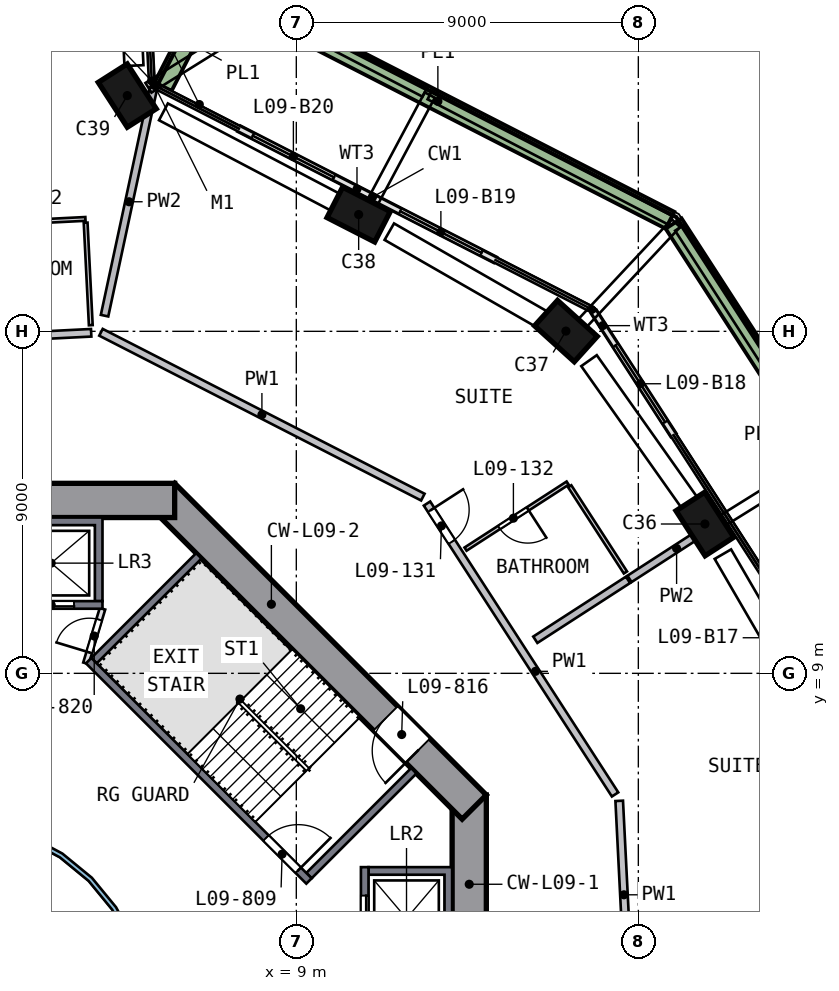
"""IFC4 building model, lengths in metres.
Left out: names, types, materials, properties, quantities, classifications, styles, units other than length and angle.
Written with IfcOpenShell. Run it as: python <this file> out.ifc"""

import sys

from ifc_helpers import new_model, si_unit, direction, frame, frame_2d, origin, origin_2d, place, context, subcontext, project, spatial, polyline, rectangle, outline, extrude, element, fill, save


model = new_model("IFC4")
c1 = context("Model", 3, precision=1e-05, world=origin(), true_north=direction((0.0, 1.0)))
c2 = subcontext(c1, "Body", "Model", "MODEL_VIEW")
j1 = project(units=[si_unit("LENGTHUNIT", "METRE"), si_unit("PLANEANGLEUNIT", "RADIAN")], contexts=[c1])
p1 = place(None, origin())
s1 = spatial("IfcSite", under=j1, at=p1, CompositionType="ELEMENT")
p2 = place(p1, origin())
s2 = spatial("IfcBuilding", under=s1, at=p2, CompositionType="ELEMENT")
p3 = place(p2, frame((0.0, 0.0, 46.0)))
s3 = spatial("IfcBuildingStorey", under=s2, at=p3, CompositionType="ELEMENT", Elevation=46.0)
p4 = place(p3, frame((19.826, 12.816, 0.0), z_axis=(-0.061752629, 0.093845743, 0.993669759), x_axis=(-0.539148529, 0.83468518, -0.112336608)))
e1 = element("IfcColumn", 1, at=p4, inside=s3, PredefinedType="COLUMN", context=c2, shape_type="SweptSolid", body=[
    extrude(rectangle(XDim=1.4, YDim=0.9, at=origin_2d()), origin(), (0.0, 0.0, 1.0), 3.21),
])
p5 = place(p3, frame((16.198, 17.914, 0.0), z_axis=(-0.085835533, 0.076332042, 0.993380934), x_axis=(0.736686462, -0.666408039, 0.114862444)))
e2 = element("IfcColumn", 2, at=p5, inside=s3, PredefinedType="COLUMN", context=c2, shape_type="SweptSolid", body=[
    extrude(rectangle(XDim=1.4, YDim=0.9, at=origin_2d()), origin(), (0.0, 0.0, 1.0), 3.211),
])
p6 = place(p3, frame((10.762, 21.013, 0.0), z_axis=(-0.100386469, 0.050345335, 0.993673943), x_axis=(-0.884418594, 0.452981845, -0.112299596)))
e3 = element("IfcColumn", 3, at=p6, inside=s3, PredefinedType="COLUMN", context=c2, shape_type="SweptSolid", body=[
    extrude(rectangle(XDim=1.4, YDim=0.9, at=origin_2d()), origin(), (0.0, 0.0, 1.0), 3.21),
])
p7 = place(p3, frame((4.691, 24.178, 0.0), z_axis=(-0.115152044, 0.021282226, 0.993119869), x_axis=(0.535782843, -0.8405444, 0.080136495)))
e4 = element("IfcColumn", 4, at=p7, inside=s3, PredefinedType="COLUMN", context=c2, shape_type="SweptSolid", body=[
    extrude(rectangle(XDim=1.4, YDim=0.9, at=origin_2d()), origin(), (0.0, 0.0, 1.0), 3.212),
])
p8 = place(p3, frame((13.55, -5.799, 0.0), z_axis=(0.0, 0.0, 1.0), x_axis=(0.0, 1.0, 0.0)))
e5 = element("IfcWall", 5, at=p8, inside=s3, PredefinedType="SHEAR", context=c2, shape_type="SweptSolid", body=[
    extrude(rectangle(XDim=11.598, YDim=0.9, at=frame_2d((5.799, 0.0))), origin(), (0.0, 0.0, 1.0), 3.5),
])
p9 = place(p8, frame((4.899, 0.0, 0.0)))
e6 = element("IfcOpeningElement", 6, at=p9, cuts=e5, PredefinedType="OPENING", context=c2, shape_type="SweptSolid", body=[
    extrude(rectangle(XDim=1.8, YDim=2.1, at=frame_2d((0.9, 1.05))), frame((0.0, 0.46, 0.0), z_axis=(0.0, -1.0, 0.0), x_axis=(1.0, 0.0, 0.0)), (0.0, 0.0, 1.0), 0.92),
])
p10 = place(p3, frame((13.682, 5.481, 0.0), z_axis=(0.0, 0.0, 1.0), x_axis=(-0.707106781, 0.707106781, 0.0)))
e7 = element("IfcWall", 7, at=p10, inside=s3, PredefinedType="SHEAR", context=c2, shape_type="SweptSolid", body=[
    extrude(rectangle(XDim=11.598, YDim=0.9, at=frame_2d((5.799, 0.0))), origin(), (0.0, 0.0, 1.0), 3.5),
])
p11 = place(p10, frame((2.099, 0.0, 0.0)))
e8 = element("IfcOpeningElement", 8, at=p11, cuts=e7, PredefinedType="OPENING", context=c2, shape_type="SweptSolid", body=[
    extrude(rectangle(XDim=1.2, YDim=2.1, at=frame_2d((0.6, 1.05))), frame((0.0, 0.46, 0.0), z_axis=(0.0, -1.0, 0.0), x_axis=(1.0, 0.0, 0.0)), (0.0, 0.0, 1.0), 0.92),
])
p12 = place(p3, frame((5.799, 13.55, 0.0), z_axis=(0.0, 0.0, 1.0), x_axis=(-1.0, 0.0, 0.0)))
e9 = element("IfcWall", 9, at=p12, inside=s3, PredefinedType="SHEAR", context=c2, shape_type="SweptSolid", body=[
    extrude(rectangle(XDim=11.598, YDim=0.9, at=frame_2d((5.799, 0.0))), origin(), (0.0, 0.0, 1.0), 3.5),
])
p13 = place(p12, frame((4.899, 0.0, 0.0)))
e10 = element("IfcOpeningElement", 10, at=p13, cuts=e9, PredefinedType="OPENING", context=c2, shape_type="SweptSolid", body=[
    extrude(rectangle(XDim=1.8, YDim=2.1, at=frame_2d((0.9, 1.05))), frame((0.0, 0.46, 0.0), z_axis=(0.0, -1.0, 0.0), x_axis=(1.0, 0.0, 0.0)), (0.0, 0.0, 1.0), 0.92),
])
p14 = place(p3, frame((18.921, 15.277, 0.0), z_axis=(0.0, 0.0, 1.0), x_axis=(-0.542898146, 0.839798549, 0.0)))
e11 = element("IfcWall", 11, at=p14, inside=s3, PredefinedType="SOLIDWALL", context=c2, shape_type="SweptSolid", body=[
    extrude(rectangle(XDim=3.842, YDim=0.15, at=frame_2d((1.921, 0.0))), origin(), (0.0, 0.0, 1.0), 2.425),
])
p15 = place(p14, frame((0.4, 0.0, 0.0)))
e12 = element("IfcOpeningElement", 12, at=p15, cuts=e11, PredefinedType="OPENING", context=c2, shape_type="SweptSolid", body=[
    extrude(rectangle(XDim=2.4, YDim=2.4, at=frame_2d((1.2, 1.2))), frame((0.0, 0.085, 0.0), z_axis=(0.0, -1.0, 0.0), x_axis=(1.0, 0.0, 0.0)), (0.0, 0.0, 1.0), 0.17),
])
p16 = place(p3, frame((14.228, 19.883, 0.0), z_axis=(0.0, 0.0, 1.0), x_axis=(-0.890044707, 0.455873249, 0.0)))
e13 = element("IfcWall", 13, at=p16, inside=s3, PredefinedType="SOLIDWALL", context=c2, shape_type="SweptSolid", body=[
    extrude(rectangle(XDim=3.6, YDim=0.15, at=frame_2d((1.8, 0.0))), origin(), (0.0, 0.0, 1.0), 2.425),
])
p17 = place(p16, frame((0.4, 0.0, 0.0)))
e14 = element("IfcOpeningElement", 14, at=p17, cuts=e13, PredefinedType="OPENING", context=c2, shape_type="SweptSolid", body=[
    extrude(rectangle(XDim=2.4, YDim=2.4, at=frame_2d((1.2, 1.2))), frame((0.0, 0.085, 0.0), z_axis=(0.0, -1.0, 0.0), x_axis=(1.0, 0.0, 0.0)), (0.0, 0.0, 1.0), 0.17),
])
p18 = place(p3, frame((11.024, 21.524, 0.0), z_axis=(0.0, 0.0, 1.0), x_axis=(-0.890058005, 0.455847285, 0.0)))
e15 = element("IfcWall", 15, at=p18, inside=s3, PredefinedType="SOLIDWALL", context=c2, shape_type="SweptSolid", body=[
    extrude(rectangle(XDim=3.961, YDim=0.15, at=frame_2d((1.98, 0.0))), origin(), (0.0, 0.0, 1.0), 2.425),
])
p19 = place(p18, frame((1.16, 0.0, 0.0)))
e16 = element("IfcOpeningElement", 16, at=p19, cuts=e15, PredefinedType="OPENING", context=c2, shape_type="SweptSolid", body=[
    extrude(rectangle(XDim=2.4, YDim=2.4, at=frame_2d((1.2, 1.2))), frame((0.0, 0.085, 0.0), z_axis=(0.0, -1.0, 0.0), x_axis=(1.0, 0.0, 0.0)), (0.0, 0.0, 1.0), 0.17),
])
p20 = place(p3, frame((26.107, 9.732, 0.0), z_axis=(0.0, 0.0, 1.0), x_axis=(-0.542889903, 0.839803878, 0.0)))
e17 = element("IfcWall", 17, at=p20, inside=s3, PredefinedType="SOLIDWALL", context=c2, shape_type="SweptSolid", body=[
    extrude(rectangle(XDim=13.224, YDim=0.5, at=frame_2d((6.612, 0.0))), origin(), (0.0, 0.0, 1.0), 0.7),
])
p21 = place(p3, frame((18.832, 20.924, 0.0), z_axis=(0.0, 0.0, 1.0), x_axis=(-0.89005516, 0.45585284, 0.0)))
e18 = element("IfcWall", 18, at=p21, inside=s3, PredefinedType="SOLIDWALL", context=c2, shape_type="SweptSolid", body=[
    extrude(rectangle(XDim=13.723, YDim=0.5, at=frame_2d((6.862, 0.0))), origin(), (0.0, 0.0, 1.0), 0.7),
])
p22 = place(p3, frame((6.726, 26.844, 0.0), z_axis=(0.0, 0.0, 1.0), x_axis=(-0.45587587, -0.890043365, 0.0)))
e19 = element("IfcWall", 19, at=p22, inside=s3, PredefinedType="SOLIDWALL", context=c2, shape_type="SweptSolid", body=[
    extrude(rectangle(XDim=2.699, YDim=0.5, at=frame_2d((1.35, 0.0))), origin(), (0.0, 0.0, 1.0), 0.7),
])
p23 = place(p3, origin())
e20 = element("IfcWall", 20, at=p23, inside=s3, PredefinedType="SOLIDWALL", context=c2, shape_type="SweptSolid", body=[
    extrude(outline(polyline([(13.1, 3.9), (13.1, 1.2), (10.9, 1.2), (10.9, 1.4), (12.9, 1.4), (12.9, 3.7), (10.9, 3.7), (10.9, 3.9), (13.1, 3.9)])), origin(), (0.0, 0.0, 1.0), 3.19),
])
p24 = place(p3, frame((10.8, 1.2, 0.0), z_axis=(0.0, 0.0, 1.0), x_axis=(0.0, 1.0, 0.0)))
e21 = element("IfcWall", 21, at=p24, inside=s3, PredefinedType="SOLIDWALL", context=c2, shape_type="SweptSolid", body=[
    extrude(rectangle(XDim=2.7, YDim=0.2, at=frame_2d((1.35, 0.0))), origin(), (0.0, 0.0, 1.0), 3.19),
])
p25 = place(p24, frame((0.75, 0.0, 0.0)))
e22 = element("IfcOpeningElement", 22, at=p25, cuts=e21, PredefinedType="OPENING", context=c2, shape_type="SweptSolid", body=[
    extrude(rectangle(XDim=1.2, YDim=2.1, at=frame_2d((0.6, 1.05))), frame((0.0, 0.11, 0.0), z_axis=(0.0, -1.0, 0.0), x_axis=(1.0, 0.0, 0.0)), (0.0, 0.0, 1.0), 0.22),
])
p26 = place(p3, origin())
e23 = element("IfcWall", 23, at=p26, inside=s3, PredefinedType="SOLIDWALL", context=c2, shape_type="SweptSolid", body=[
    extrude(outline(polyline([(3.9, 13.1), (3.9, 10.9), (3.7, 10.9), (3.7, 12.9), (1.4, 12.9), (1.4, 10.9), (1.2, 10.9), (1.2, 13.1), (3.9, 13.1)])), origin(), (0.0, 0.0, 1.0), 3.19),
])
p27 = place(p3, frame((1.2, 10.8, 0.0), z_axis=(0.0, 0.0, 1.0), x_axis=(1.0, 0.0, 0.0)))
e24 = element("IfcWall", 24, at=p27, inside=s3, PredefinedType="SOLIDWALL", context=c2, shape_type="SweptSolid", body=[
    extrude(rectangle(XDim=2.7, YDim=0.2, at=frame_2d((1.35, 0.0))), origin(), (0.0, 0.0, 1.0), 3.19),
])
p28 = place(p27, frame((0.75, 0.0, 0.0)))
e25 = element("IfcOpeningElement", 25, at=p28, cuts=e24, PredefinedType="OPENING", context=c2, shape_type="SweptSolid", body=[
    extrude(rectangle(XDim=1.2, YDim=2.1, at=frame_2d((0.6, 1.05))), frame((0.0, 0.11, 0.0), z_axis=(0.0, -1.0, 0.0), x_axis=(1.0, 0.0, 0.0)), (0.0, 0.0, 1.0), 0.22),
])
p29 = place(p3, frame((3.535, 9.334, 0.0), z_axis=(0.0, 0.0, 1.0), x_axis=(0.707106781, -0.707106781, 0.0)))
e26 = element("IfcWall", 26, at=p29, inside=s3, PredefinedType="SOLIDWALL", context=c2, shape_type="SweptSolid", body=[
    extrude(rectangle(XDim=8.2, YDim=0.2, at=frame_2d((4.1, 0.0))), origin(), (0.0, 0.0, 1.0), 3.19),
])
p30 = place(p29, frame((6.6, 0.0, 0.0)))
e27 = element("IfcOpeningElement", 27, at=p30, cuts=e26, PredefinedType="OPENING", context=c2, shape_type="SweptSolid", body=[
    extrude(rectangle(XDim=1.2, YDim=2.1, at=frame_2d((0.6, 1.05))), frame((0.0, 0.11, 0.0), z_axis=(0.0, -1.0, 0.0), x_axis=(1.0, 0.0, 0.0)), (0.0, 0.0, 1.0), 0.22),
])
for number, where, z_axis, x_axis in (
    (28, (9.334, 3.677, 0.0), (0.0, 0.0, 1.0), (0.707, 0.707, 0.0)),
    (29, (3.677, 9.334, 0.0), (0.0, 0.0, 1.0), (0.707, 0.707, 0.0)),
):
    element("IfcWall", number, at=place(p3, frame(where, z_axis=z_axis, x_axis=x_axis)), inside=s3, PredefinedType="SOLIDWALL", context=c2, shape_type="SweptSolid", body=[
        extrude(rectangle(XDim=3.9, YDim=0.2, at=frame_2d((1.95, 0.0))), origin(), (0.0, 0.0, 1.0), 3.19),
    ])
p31 = place(p3, frame((3.465, 9.263, 0.0), z_axis=(0.0, 0.0, 1.0), x_axis=(0.289808785, 0.957084567, 0.0)))
e30 = element("IfcWall", 30, at=p31, inside=s3, PredefinedType="PARTITIONING", context=c2, shape_type="SweptSolid", body=[
    extrude(rectangle(XDim=1.501, YDim=0.15, at=frame_2d((0.75, 0.0))), origin(), (0.0, 0.0, 1.0), 3.19),
])
p32 = place(p31, frame((0.301, 0.0, 0.0)))
e31 = element("IfcOpeningElement", 31, at=p32, cuts=e30, PredefinedType="OPENING", context=c2, shape_type="SweptSolid", body=[
    extrude(rectangle(XDim=0.9, YDim=2.1, at=frame_2d((0.45, 1.05))), frame((0.0, 0.085, 0.0), z_axis=(0.0, -1.0, 0.0), x_axis=(1.0, 0.0, 0.0)), (0.0, 0.0, 1.0), 0.17),
])
p33 = place(p3, origin())
e32 = element("IfcWall", 32, at=p33, inside=s3, PredefinedType="SOLIDWALL", context=c2, shape_type="SweptSolid", body=[
    extrude(outline(polyline([(5.021, -0.999), (4.73, -1.959), (4.257, -2.844), (3.62, -3.62), (2.844, -4.257), (1.959, -4.73), (0.999, -5.021), (0.0, -5.12), (-0.999, -5.021), (-1.959, -4.73), (-2.844, -4.257), (-3.62, -3.62), (-4.257, -2.844), (-4.73, -1.959), (-5.021, -0.999), (-5.12, 0.0), (-5.021, 0.999), (-4.73, 1.959), (-4.257, 2.844), (-3.62, 3.62), (-2.844, 4.257), (-1.959, 4.73), (-0.999, 5.021), (0.0, 5.12), (0.999, 5.021), (1.959, 4.73), (2.844, 4.257), (3.62, 3.62), (4.257, 2.844), (4.73, 1.959), (5.021, 0.999), (5.12, 0.0), (5.021, -0.999)]), holes=[polyline([(4.904, 0.976), (4.619, 1.913), (4.157, 2.778), (3.535, 3.535), (2.778, 4.157), (1.913, 4.619), (0.976, 4.904), (0.0, 5.0), (-0.976, 4.904), (-1.913, 4.619), (-2.778, 4.157), (-3.535, 3.535), (-4.157, 2.778), (-4.619, 1.913), (-4.904, 0.976), (-5.0, 0.0), (-4.904, -0.976), (-4.619, -1.913), (-4.157, -2.778), (-3.535, -3.535), (-2.778, -4.157), (-1.913, -4.619), (-0.976, -4.904), (0.0, -5.0), (0.976, -4.904), (1.913, -4.619), (2.778, -4.157), (3.535, -3.535), (4.157, -2.778), (4.619, -1.913), (4.904, -0.976), (5.0, 0.0), (4.904, 0.976)])]), origin(), (0.0, 0.0, 1.0), 3.19),
])
p34 = place(p3, frame((3.602, 17.962, 0.0), z_axis=(0.0, 0.0, 1.0), x_axis=(-0.998739593, -0.050191888, 0.0)))
e33 = element("IfcWall", 33, at=p34, inside=s3, PredefinedType="SOLIDWALL", context=c2, shape_type="SweptSolid", body=[
    extrude(rectangle(XDim=3.4, YDim=0.2, at=frame_2d((1.7, 0.0))), origin(), (0.0, 0.0, 1.0), 3.19),
])
p35 = place(p3, frame((12.33, 13.637, 0.0), z_axis=(0.0, 0.0, 1.0), x_axis=(-0.890044127, 0.455874383, 0.0)))
e34 = element("IfcWall", 34, at=p35, inside=s3, PredefinedType="SOLIDWALL", context=c2, shape_type="SweptSolid", body=[
    extrude(rectangle(XDim=9.516, YDim=0.2, at=frame_2d((4.758, 0.0))), origin(), (0.0, 0.0, 1.0), 3.19),
])
p36 = place(p3, frame((12.439, 13.468, 0.0), z_axis=(0.0, 0.0, 1.0), x_axis=(0.542889201, -0.839804331, 0.0)))
e35 = element("IfcWall", 35, at=p36, inside=s3, PredefinedType="SOLIDWALL", context=c2, shape_type="SweptSolid", body=[
    extrude(rectangle(XDim=9.115, YDim=0.2, at=frame_2d((4.558, 0.0))), origin(), (0.0, 0.0, 1.0), 3.19),
])
p37 = place(p36, frame((0.2, 0.0, 0.0)))
e36 = element("IfcOpeningElement", 36, at=p37, cuts=e35, PredefinedType="OPENING", context=c2, shape_type="SweptSolid", body=[
    extrude(rectangle(XDim=1.0, YDim=2.1, at=frame_2d((0.5, 1.05))), frame((0.0, 0.11, 0.0), z_axis=(0.0, -1.0, 0.0), x_axis=(1.0, 0.0, 0.0)), (0.0, 0.0, 1.0), 0.22),
])
p38 = place(p3, frame((17.497, 5.644, 0.0), z_axis=(0.0, 0.0, 1.0), x_axis=(0.050236925, -0.998737328, 0.0)))
e37 = element("IfcWall", 37, at=p38, inside=s3, PredefinedType="SOLIDWALL", context=c2, shape_type="SweptSolid", body=[
    extrude(rectangle(XDim=9.316, YDim=0.2, at=frame_2d((4.658, 0.0))), origin(), (0.0, 0.0, 1.0), 3.19),
])
p39 = place(p38, frame((5.15, 0.0, 0.0)))
e38 = element("IfcOpeningElement", 38, at=p39, cuts=e37, PredefinedType="OPENING", context=c2, shape_type="SweptSolid", body=[
    extrude(rectangle(XDim=1.0, YDim=2.1, at=frame_2d((0.5, 1.05))), frame((0.0, 0.11, 0.0), z_axis=(0.0, -1.0, 0.0), x_axis=(1.0, 0.0, 0.0)), (0.0, 0.0, 1.0), 0.22),
])
p40 = place(p3, frame((5.241, 24.408, 0.0), z_axis=(0.0, 0.0, 1.0), x_axis=(-0.209939641, -0.977714348, 0.0)))
e39 = element("IfcWall", 39, at=p40, inside=s3, PredefinedType="SOLIDWALL", context=c2, shape_type="SweptSolid", body=[
    extrude(rectangle(XDim=6.132, YDim=0.2, at=frame_2d((3.066, 0.0))), origin(), (0.0, 0.0, 1.0), 3.19),
])
p41 = place(p3, frame((15.289, 9.884, 0.0), z_axis=(0.0, 0.0, 1.0), x_axis=(0.839815863, 0.542871363, 0.0)))
e40 = element("IfcWall", 40, at=p41, inside=s3, PredefinedType="SOLIDWALL", context=c2, shape_type="SweptSolid", body=[
    extrude(rectangle(XDim=2.905, YDim=0.2, at=frame_2d((1.452, 0.0))), origin(), (0.0, 0.0, 1.0), 3.19),
])
p42 = place(p3, frame((17.767, 11.485, 0.0), z_axis=(0.0, 0.0, 1.0), x_axis=(0.839805289, 0.542887721, 0.0)))
e41 = element("IfcWall", 41, at=p42, inside=s3, PredefinedType="SOLIDWALL", context=c2, shape_type="SweptSolid", body=[
    extrude(rectangle(XDim=2.952, YDim=0.2, at=frame_2d((1.476, 0.0))), origin(), (0.0, 0.0, 1.0), 3.19),
])
p43 = place(p3, frame((3.451, 20.958, 0.0), z_axis=(0.0, 0.0, 1.0), x_axis=(-0.998735349, -0.050276266, 0.0)))
e42 = element("IfcWall", 42, at=p43, inside=s3, PredefinedType="PARTITIONING", context=c2, shape_type="SweptSolid", body=[
    extrude(rectangle(XDim=3.2, YDim=0.1, at=frame_2d((1.6, 0.0))), origin(), (0.0, 0.0, 1.0), 3.19),
])
p44 = place(p43, frame((1.25, 0.0, 0.0)))
e43 = element("IfcOpeningElement", 43, at=p44, cuts=e42, PredefinedType="OPENING", context=c2, shape_type="SweptSolid", body=[
    extrude(rectangle(XDim=0.9, YDim=2.1, at=frame_2d((0.45, 1.05))), frame((0.0, 0.06, 0.0), z_axis=(0.0, -1.0, 0.0), x_axis=(1.0, 0.0, 0.0)), (0.0, 0.0, 1.0), 0.12),
])
p45 = place(p3, frame((3.456, 20.858, 0.0), z_axis=(0.0, 0.0, 1.0), x_axis=(0.050271319, -0.998735598, 0.0)))
e44 = element("IfcWall", 44, at=p45, inside=s3, PredefinedType="PARTITIONING", context=c2, shape_type="SweptSolid", body=[
    extrude(rectangle(XDim=2.7, YDim=0.1, at=frame_2d((1.35, 0.0))), origin(), (0.0, 0.0, 1.0), 3.19),
])
p46 = place(p3, frame((16.14, 14.006, 0.0), z_axis=(0.0, 0.0, 1.0), x_axis=(-0.83984229, -0.542830477, 0.0)))
e45 = element("IfcWall", 45, at=p46, inside=s3, PredefinedType="PARTITIONING", context=c2, shape_type="SweptSolid", body=[
    extrude(rectangle(XDim=3.2, YDim=0.1, at=frame_2d((1.6, 0.0))), origin(), (0.0, 0.0, 1.0), 3.19),
])
p47 = place(p46, frame((1.25, 0.0, 0.0)))
e46 = element("IfcOpeningElement", 46, at=p47, cuts=e45, PredefinedType="OPENING", context=c2, shape_type="SweptSolid", body=[
    extrude(rectangle(XDim=0.9, YDim=2.1, at=frame_2d((0.45, 1.05))), frame((0.0, 0.06, 0.0), z_axis=(0.0, -1.0, 0.0), x_axis=(1.0, 0.0, 0.0)), (0.0, 0.0, 1.0), 0.12),
])
p48 = place(p3, frame((16.195, 13.922, 0.0), z_axis=(0.0, 0.0, 1.0), x_axis=(0.542876316, -0.839812661, 0.0)))
e47 = element("IfcWall", 47, at=p48, inside=s3, PredefinedType="PARTITIONING", context=c2, shape_type="SweptSolid", body=[
    extrude(rectangle(XDim=2.7, YDim=0.1, at=frame_2d((1.35, 0.0))), origin(), (0.0, 0.0, 1.0), 3.19),
])
p49 = place(p15, origin())
e48 = element("IfcDoor", 48, at=p49, inside=s3, OperationType="SLIDING_TO_RIGHT", PredefinedType="DOOR", context=c2, shape_type="SweptSolid", body=[
    extrude(rectangle(XDim=2.4, YDim=2.4, at=frame_2d((1.2, 1.2))), frame((0.0, 0.025, 0.0), z_axis=(0.0, -1.0, 0.0), x_axis=(1.0, 0.0, 0.0)), (0.0, 0.0, 1.0), 0.05),
])
fill(e12, e48)
p50 = place(p17, origin())
e49 = element("IfcDoor", 49, at=p50, inside=s3, OperationType="SLIDING_TO_RIGHT", PredefinedType="DOOR", context=c2, shape_type="SweptSolid", body=[
    extrude(rectangle(XDim=2.4, YDim=2.4, at=frame_2d((1.2, 1.2))), frame((0.0, 0.025, 0.0), z_axis=(0.0, -1.0, 0.0), x_axis=(1.0, 0.0, 0.0)), (0.0, 0.0, 1.0), 0.05),
])
fill(e14, e49)
p51 = place(p19, origin())
e50 = element("IfcDoor", 50, at=p51, inside=s3, OperationType="SLIDING_TO_LEFT", PredefinedType="DOOR", context=c2, shape_type="SweptSolid", body=[
    extrude(rectangle(XDim=2.4, YDim=2.4, at=frame_2d((1.2, 1.2))), frame((0.0, 0.025, 0.0), z_axis=(0.0, -1.0, 0.0), x_axis=(1.0, 0.0, 0.0)), (0.0, 0.0, 1.0), 0.05),
])
fill(e16, e50)
p52 = place(p25, origin())
e51 = element("IfcDoor", 51, at=p52, inside=s3, OperationType="DOUBLE_DOOR_SLIDING", PredefinedType="DOOR", context=c2, shape_type="SweptSolid", body=[
    extrude(rectangle(XDim=1.2, YDim=2.1, at=frame_2d((0.6, 1.05))), frame((0.0, 0.025, 0.0), z_axis=(0.0, -1.0, 0.0), x_axis=(1.0, 0.0, 0.0)), (0.0, 0.0, 1.0), 0.05),
])
fill(e22, e51)
p53 = place(p28, origin())
e52 = element("IfcDoor", 52, at=p53, inside=s3, OperationType="DOUBLE_DOOR_SLIDING", PredefinedType="DOOR", context=c2, shape_type="SweptSolid", body=[
    extrude(rectangle(XDim=1.2, YDim=2.1, at=frame_2d((0.6, 1.05))), frame((0.0, 0.025, 0.0), z_axis=(0.0, -1.0, 0.0), x_axis=(1.0, 0.0, 0.0)), (0.0, 0.0, 1.0), 0.05),
])
fill(e25, e52)
p54 = place(p30, origin())
e53 = element("IfcDoor", 53, at=p54, inside=s3, OperationType="SINGLE_SWING_RIGHT", PredefinedType="DOOR", context=c2, shape_type="SweptSolid", body=[
    extrude(rectangle(XDim=1.2, YDim=2.1, at=frame_2d((0.6, 1.05))), frame((0.0, 0.025, 0.0), z_axis=(0.0, -1.0, 0.0), x_axis=(1.0, 0.0, 0.0)), (0.0, 0.0, 1.0), 0.05),
])
fill(e27, e53)
p55 = place(p11, origin())
e54 = element("IfcDoor", 54, at=p55, inside=s3, OperationType="SINGLE_SWING_LEFT", PredefinedType="DOOR", context=c2, shape_type="SweptSolid", body=[
    extrude(rectangle(XDim=1.2, YDim=2.1, at=frame_2d((0.6, 1.05))), frame((0.0, 0.025, 0.0), z_axis=(0.0, -1.0, 0.0), x_axis=(1.0, 0.0, 0.0)), (0.0, 0.0, 1.0), 0.05),
])
fill(e8, e54)
p56 = place(p32, origin())
e55 = element("IfcDoor", 55, at=p56, inside=s3, OperationType="SINGLE_SWING_LEFT", PredefinedType="DOOR", context=c2, shape_type="SweptSolid", body=[
    extrude(rectangle(XDim=0.9, YDim=2.1, at=frame_2d((0.45, 1.05))), frame((0.0, 0.025, 0.0), z_axis=(0.0, -1.0, 0.0), x_axis=(1.0, 0.0, 0.0)), (0.0, 0.0, 1.0), 0.05),
])
fill(e31, e55)
p57 = place(p37, origin())
e56 = element("IfcDoor", 56, at=p57, inside=s3, OperationType="SINGLE_SWING_LEFT", PredefinedType="DOOR", context=c2, shape_type="SweptSolid", body=[
    extrude(rectangle(XDim=1.0, YDim=2.1, at=frame_2d((0.5, 1.05))), frame((0.0, 0.025, 0.0), z_axis=(0.0, -1.0, 0.0), x_axis=(1.0, 0.0, 0.0)), (0.0, 0.0, 1.0), 0.05),
])
fill(e36, e56)
p58 = place(p47, origin())
e57 = element("IfcDoor", 57, at=p58, inside=s3, OperationType="SINGLE_SWING_LEFT", PredefinedType="DOOR", context=c2, shape_type="SweptSolid", body=[
    extrude(rectangle(XDim=0.9, YDim=2.1, at=frame_2d((0.45, 1.05))), frame((0.0, 0.025, 0.0), z_axis=(0.0, -1.0, 0.0), x_axis=(1.0, 0.0, 0.0)), (0.0, 0.0, 1.0), 0.05),
])
fill(e46, e57)
save(model, sys.argv[1])
